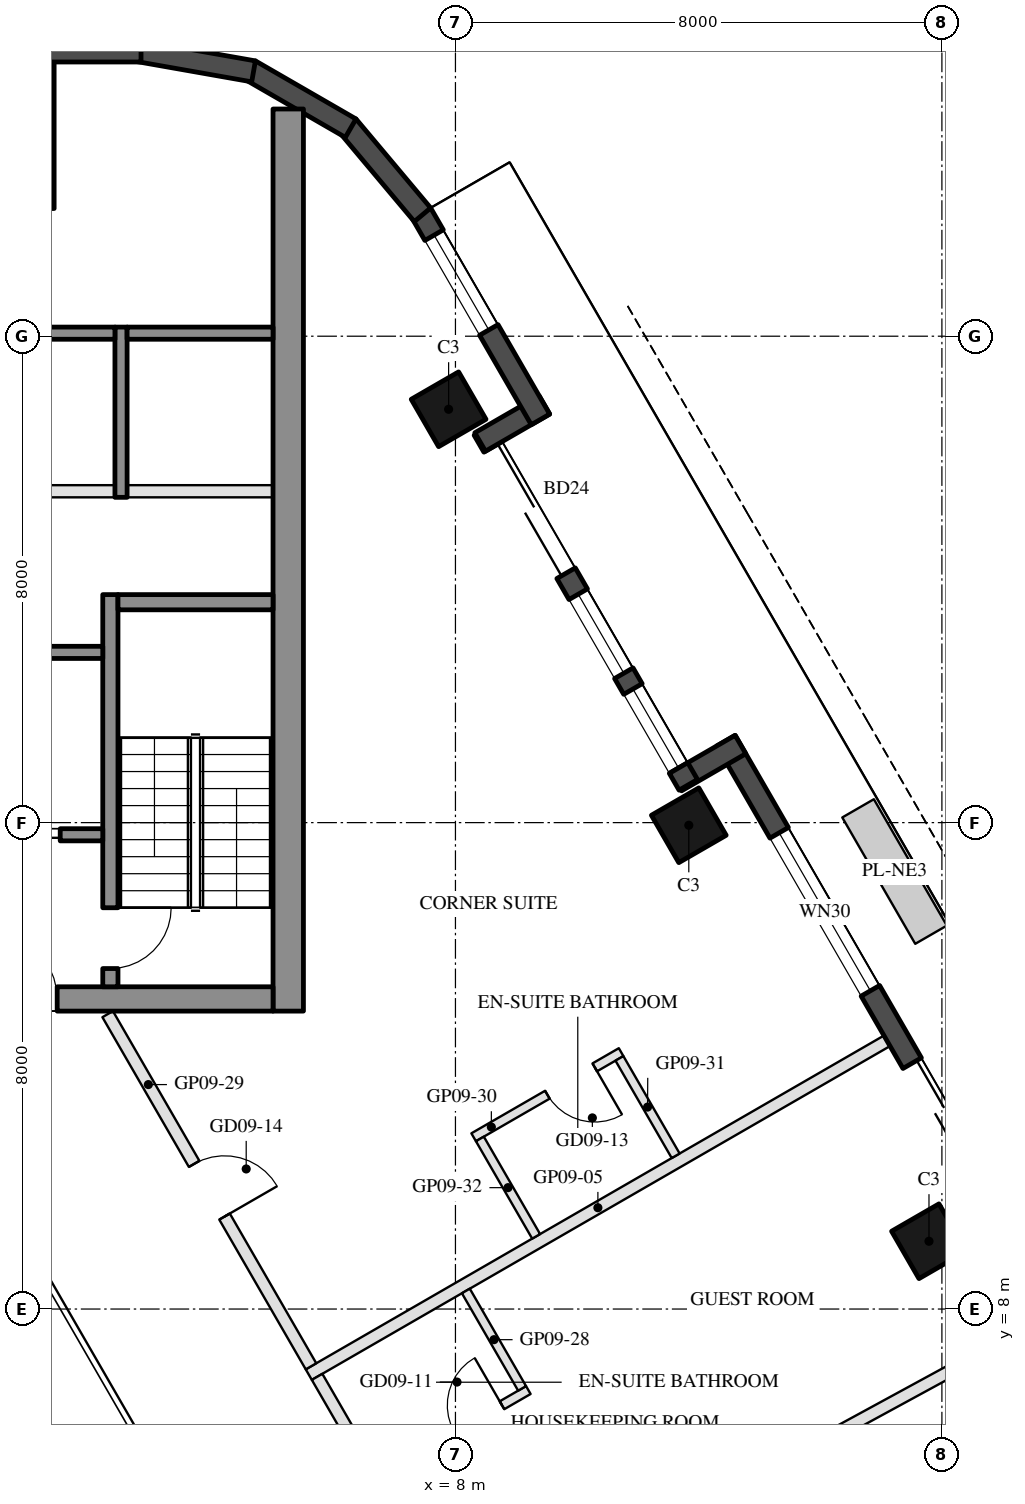
"""IFC4 building model, lengths in metres.
Left out: names, types, materials, properties, quantities, classifications, styles, units other than length and angle.
Written with IfcOpenShell. Run it as: python <this file> out.ifc"""

import sys

from ifc_helpers import new_model, si_unit, direction, frame, frame_2d, origin, origin_2d, place, context, subcontext, project, spatial, rectangle, hollow_rectangle, extrude, element, fill, save


model = new_model("IFC4")
c1 = context("Model", 3, precision=1e-05, world=origin(), true_north=direction((0.0, 1.0)))
c2 = subcontext(c1, "Body", "Model", "MODEL_VIEW")
j1 = project(units=[si_unit("LENGTHUNIT", "METRE"), si_unit("PLANEANGLEUNIT", "RADIAN")], contexts=[c1])
p1 = place(None, origin())
s1 = spatial("IfcSite", under=j1, at=p1, CompositionType="ELEMENT")
p2 = place(p1, origin())
s2 = spatial("IfcBuilding", under=s1, at=p2, CompositionType="ELEMENT")
p3 = place(p2, frame((0.0, 0.0, 109.4)))
s3 = spatial("IfcBuildingStorey", under=s2, at=p3, CompositionType="ELEMENT", Elevation=109.4)
for number, where, z_axis, x_axis in (
    (1, (15.788, 9.115, 0.0), (0.0, 0.0, 1.0), (-0.5, 0.866, 0.0)),
    (2, (11.838, 15.957, 0.0), (0.0, 0.0, 1.0), (-0.5, 0.866, 0.0)),
    (3, (7.888, 22.798, 0.0), (0.0, 0.0, 1.0), (-0.5, 0.866, 0.0)),
):
    element("IfcColumn", number, at=place(p3, frame(where, z_axis=z_axis, x_axis=x_axis)), inside=s3, PredefinedType="COLUMN", context=c2, shape_type="SweptSolid", body=[
        extrude(hollow_rectangle(XDim=0.9, YDim=0.9, WallThickness=0.04, at=origin_2d()), origin(), (0.0, 0.0, 1.0), 3.7),
    ])
p4 = place(p3, frame((0.0, 27.3, 0.0), z_axis=(0.0, 0.0, 1.0), x_axis=(1.0, 0.0, 0.0)))
e4 = element("IfcColumn", 4, at=p4, inside=s3, PredefinedType="COLUMN", context=c2, shape_type="SweptSolid", body=[
    extrude(hollow_rectangle(XDim=2.8, YDim=2.4, WallThickness=0.07, at=origin_2d()), origin(), (0.0, 0.0, 1.0), 3.7),
])
p5 = place(p3, frame((17.299, 8.948, 0.0), z_axis=(0.0, 0.0, 1.0), x_axis=(-0.500010041276, 0.866019606374, 0.0)))
e5 = element("IfcWall", 5, at=p5, inside=s3, PredefinedType="SOLIDWALL", context=c2, shape_type="SweptSolid", body=[
    extrude(rectangle(XDim=9.7, YDim=0.35, at=frame_2d((4.85, 0.0))), origin(), (0.0, 0.0, 1.0), 3.55),
])
p6 = place(p5, frame((1.775, 0.0, 0.0)))
e6 = element("IfcOpeningElement", 6, at=p6, cuts=e5, PredefinedType="OPENING", context=c2, shape_type="SweptSolid", body=[
    extrude(rectangle(XDim=1.8, YDim=2.4, at=frame_2d((0.9, 1.2))), frame((0.0, 0.185, 0.0), z_axis=(0.0, -1.0, 0.0), x_axis=(1.0, 0.0, 0.0)), (0.0, 0.0, 1.0), 0.37),
])
p7 = place(p5, frame((4.949, 0.0, 0.3)))
e7 = element("IfcOpeningElement", 7, at=p7, cuts=e5, PredefinedType="OPENING", context=c2, shape_type="SweptSolid", body=[
    extrude(rectangle(XDim=3.0, YDim=2.65, at=frame_2d((1.5, 1.325))), frame((0.0, 0.185, 0.0), z_axis=(0.0, -1.0, 0.0), x_axis=(1.0, 0.0, 0.0)), (0.0, 0.0, 1.0), 0.37),
])
p8 = place(p3, frame((12.688, 17.284, 0.0), z_axis=(0.0, 0.0, 1.0), x_axis=(-0.865955602162, -0.500120880472, 0.0)))
e8 = element("IfcWall", 8, at=p8, inside=s3, PredefinedType="SOLIDWALL", context=c2, shape_type="SweptSolid", body=[
    extrude(rectangle(XDim=1.22, YDim=0.35, at=frame_2d((0.61, 0.0))), origin(), (0.0, 0.0, 1.0), 3.55),
])
p9 = place(p3, frame((11.829, 16.621, 0.0), z_axis=(0.0, 0.0, 1.0), x_axis=(-0.500003597184, 0.866023326939, 0.0)))
e9 = element("IfcWall", 9, at=p9, inside=s3, PredefinedType="SOLIDWALL", context=c2, shape_type="SweptSolid", body=[
    extrude(rectangle(XDim=6.74, YDim=0.35, at=frame_2d((3.37, 0.0))), origin(), (0.0, 0.0, 1.0), 3.55),
])
p10 = place(p9, frame((4.02, 0.0, 0.0)))
e10 = element("IfcOpeningElement", 10, at=p10, cuts=e9, PredefinedType="OPENING", context=c2, shape_type="SweptSolid", body=[
    extrude(rectangle(XDim=2.4, YDim=2.4, at=frame_2d((1.2, 1.2))), frame((0.0, 0.185, 0.0), z_axis=(0.0, -1.0, 0.0), x_axis=(1.0, 0.0, 0.0)), (0.0, 0.0, 1.0), 0.37),
])
p11 = place(p9, frame((0.32, 0.0, 0.3)))
e11 = element("IfcOpeningElement", 11, at=p11, cuts=e9, PredefinedType="OPENING", context=c2, shape_type="SweptSolid", body=[
    extrude(rectangle(XDim=1.5, YDim=2.65, at=frame_2d((0.75, 1.325))), frame((0.0, 0.185, 0.0), z_axis=(0.0, -1.0, 0.0), x_axis=(1.0, 0.0, 0.0)), (0.0, 0.0, 1.0), 0.37),
])
p12 = place(p9, frame((2.12, 0.0, 0.3)))
e12 = element("IfcOpeningElement", 12, at=p12, cuts=e9, PredefinedType="OPENING", context=c2, shape_type="SweptSolid", body=[
    extrude(rectangle(XDim=1.5, YDim=2.65, at=frame_2d((0.75, 1.325))), frame((0.0, 0.185, 0.0), z_axis=(0.0, -1.0, 0.0), x_axis=(1.0, 0.0, 0.0)), (0.0, 0.0, 1.0), 0.37),
])
p13 = place(p3, frame((8.406, 22.26, 0.0), z_axis=(0.0, 0.0, 1.0), x_axis=(0.865955602162, 0.500120880472, 0.0)))
e13 = element("IfcWall", 13, at=p13, inside=s3, PredefinedType="SOLIDWALL", context=c2, shape_type="SweptSolid", body=[
    extrude(rectangle(XDim=1.22, YDim=0.35, at=frame_2d((0.61, 0.0))), origin(), (0.0, 0.0, 1.0), 3.55),
])
p14 = place(p3, frame((9.398, 22.631, 0.0), z_axis=(0.0, 0.0, 1.0), x_axis=(-0.499954521343, 0.866051659307, 0.0)))
e14 = element("IfcWall", 14, at=p14, inside=s3, PredefinedType="SOLIDWALL", context=c2, shape_type="SweptSolid", body=[
    extrude(rectangle(XDim=3.916, YDim=0.35, at=frame_2d((1.958, 0.0))), origin(), (0.0, 0.0, 1.0), 3.55),
])
p15 = place(p14, frame((1.7, 0.0, 0.3)))
e15 = element("IfcOpeningElement", 15, at=p15, cuts=e14, PredefinedType="OPENING", context=c2, shape_type="SweptSolid", body=[
    extrude(rectangle(XDim=1.8, YDim=2.65, at=frame_2d((0.9, 1.325))), frame((0.0, 0.185, 0.0), z_axis=(0.0, -1.0, 0.0), x_axis=(1.0, 0.0, 0.0)), (0.0, 0.0, 1.0), 0.37),
])
p16 = place(p3, frame((7.458, 25.998, 0.0), z_axis=(0.0, 0.0, 1.0), x_axis=(-0.642808304945, 0.766027077259, 0.0)))
e16 = element("IfcWall", 16, at=p16, inside=s3, PredefinedType="SOLIDWALL", context=c2, shape_type="SweptSolid", body=[
    extrude(rectangle(XDim=1.91, YDim=0.35, at=frame_2d((0.955, 0.0))), origin(), (0.0, 0.0, 1.0), 3.55),
])
for number, where, z_axis, x_axis in (
    (17, (6.277, 27.422, 0.0), (0.0, 0.0, 1.0), (-0.866, 0.5, 0.0)),
    (18, (4.68, 28.356, 0.0), (0.0, 0.0, 1.0), (-0.985, 0.174, 0.0)),
):
    element("IfcWall", number, at=place(p3, frame(where, z_axis=z_axis, x_axis=x_axis)), inside=s3, PredefinedType="SOLIDWALL", context=c2, shape_type="SweptSolid", body=[
        extrude(rectangle(XDim=1.91, YDim=0.35, at=frame_2d((0.955, 0.0))), origin(), (0.0, 0.0, 1.0), 3.55),
    ])
p17 = place(p3, frame((2.829, 28.685, 0.0), z_axis=(0.0, 0.0, 1.0), x_axis=(-1.0, 0.0, 0.0)))
e19 = element("IfcWall", 19, at=p17, inside=s3, PredefinedType="SOLIDWALL", context=c2, shape_type="SweptSolid", body=[
    extrude(rectangle(XDim=5.658, YDim=0.35, at=frame_2d((2.829, 0.0))), origin(), (0.0, 0.0, 1.0), 3.55),
])
p18 = place(p3, frame((5.25, 12.9, 0.0), z_axis=(0.0, 0.0, 1.0), x_axis=(0.0, 1.0, 0.0)))
e20 = element("IfcWall", 20, at=p18, inside=s3, PredefinedType="SHEAR", context=c2, shape_type="SweptSolid", body=[
    extrude(rectangle(XDim=14.837, YDim=0.5, at=frame_2d((7.418, 0.0))), origin(), (0.0, 0.0, 1.0), 3.5),
])
p19 = place(p3, frame((5.0, 13.1, 0.0), z_axis=(0.0, 0.0, 1.0), x_axis=(-1.0, 0.0, 0.0)))
e21 = element("IfcWall", 21, at=p19, inside=s3, PredefinedType="SHEAR", context=c2, shape_type="SweptSolid", body=[
    extrude(rectangle(XDim=10.0, YDim=0.4, at=frame_2d((5.0, 0.0))), origin(), (0.0, 0.0, 1.0), 3.5),
])
p20 = place(p19, frame((3.55, 0.0, 0.0)))
e22 = element("IfcOpeningElement", 22, at=p20, cuts=e21, PredefinedType="OPENING", context=c2, shape_type="SweptSolid", body=[
    extrude(rectangle(XDim=1.1, YDim=2.1, at=frame_2d((0.55, 1.05))), frame((0.0, 0.21, 0.0), z_axis=(0.0, -1.0, 0.0), x_axis=(1.0, 0.0, 0.0)), (0.0, 0.0, 1.0), 0.42),
])
p21 = place(p19, frame((5.85, 0.0, 0.0)))
e23 = element("IfcOpeningElement", 23, at=p21, cuts=e21, PredefinedType="OPENING", context=c2, shape_type="SweptSolid", body=[
    extrude(rectangle(XDim=1.4, YDim=2.1, at=frame_2d((0.7, 1.05))), frame((0.0, 0.21, 0.0), z_axis=(0.0, -1.0, 0.0), x_axis=(1.0, 0.0, 0.0)), (0.0, 0.0, 1.0), 0.42),
])
p22 = place(p3, frame((2.325, 13.3, 0.0), z_axis=(0.0, 0.0, 1.0), x_axis=(0.0, 1.0, 0.0)))
e24 = element("IfcWall", 24, at=p22, inside=s3, PredefinedType="SHEAR", context=c2, shape_type="SweptSolid", body=[
    extrude(rectangle(XDim=6.45, YDim=0.25, at=frame_2d((3.225, 0.0))), origin(), (0.0, 0.0, 1.0), 3.5),
])
p23 = place(p22, frame((0.3, 0.0, 0.0)))
e25 = element("IfcOpeningElement", 25, at=p23, cuts=e24, PredefinedType="OPENING", context=c2, shape_type="SweptSolid", body=[
    extrude(rectangle(XDim=1.0, YDim=2.1, at=frame_2d((0.5, 1.05))), frame((0.0, 0.135, 0.0), z_axis=(0.0, -1.0, 0.0), x_axis=(1.0, 0.0, 0.0)), (0.0, 0.0, 1.0), 0.27),
])
p24 = place(p3, frame((5.0, 19.625, 0.0), z_axis=(0.0, 0.0, 1.0), x_axis=(-1.0, 0.0, 0.0)))
e26 = element("IfcWall", 26, at=p24, inside=s3, PredefinedType="SHEAR", context=c2, shape_type="SweptSolid", body=[
    extrude(rectangle(XDim=2.55, YDim=0.25, at=frame_2d((1.275, 0.0))), origin(), (0.0, 0.0, 1.0), 3.5),
])
p25 = place(p3, frame((2.2, 18.8, 0.0), z_axis=(0.0, 0.0, 1.0), x_axis=(-1.0, 0.0, 0.0)))
e27 = element("IfcWall", 27, at=p25, inside=s3, PredefinedType="SHEAR", context=c2, shape_type="SweptSolid", body=[
    extrude(rectangle(XDim=2.8, YDim=0.2, at=frame_2d((1.4, 0.0))), origin(), (0.0, 0.0, 1.0), 3.5),
])
p26 = place(p3, frame((2.2, 15.8, 0.0), z_axis=(0.0, 0.0, 1.0), x_axis=(-1.0, 0.0, 0.0)))
e28 = element("IfcWall", 28, at=p26, inside=s3, PredefinedType="SHEAR", context=c2, shape_type="SweptSolid", body=[
    extrude(rectangle(XDim=2.8, YDim=0.2, at=frame_2d((1.4, 0.0))), origin(), (0.0, 0.0, 1.0), 3.5),
])
p27 = place(p26, frame((0.7, 0.0, 0.0)))
e29 = element("IfcOpeningElement", 29, at=p27, cuts=e28, PredefinedType="OPENING", context=c2, shape_type="SweptSolid", body=[
    extrude(rectangle(XDim=1.2, YDim=2.1, at=frame_2d((0.6, 1.05))), frame((0.0, 0.11, 0.0), z_axis=(0.0, -1.0, 0.0), x_axis=(1.0, 0.0, 0.0)), (0.0, 0.0, 1.0), 0.22),
])
p28 = place(p3, frame((2.5, 21.35, 0.0), z_axis=(0.0, 0.0, 1.0), x_axis=(0.0, 1.0, 0.0)))
e30 = element("IfcWall", 30, at=p28, inside=s3, PredefinedType="SHEAR", context=c2, shape_type="SweptSolid", body=[
    extrude(rectangle(XDim=2.8, YDim=0.2, at=frame_2d((1.4, 0.0))), origin(), (0.0, 0.0, 1.0), 3.5),
])
p29 = place(p3, frame((5.0, 24.05, 0.0), z_axis=(0.0, 0.0, 1.0), x_axis=(-1.0, 0.0, 0.0)))
e31 = element("IfcWall", 31, at=p29, inside=s3, PredefinedType="SHEAR", context=c2, shape_type="SweptSolid", body=[
    extrude(rectangle(XDim=2.4, YDim=0.2, at=frame_2d((1.2, 0.0))), origin(), (0.0, 0.0, 1.0), 3.5),
])
p30 = place(p3, frame((2.4, 24.05, 0.0), z_axis=(0.0, 0.0, 1.0), x_axis=(-1.0, 0.0, 0.0)))
e32 = element("IfcWall", 32, at=p30, inside=s3, PredefinedType="SHEAR", context=c2, shape_type="SweptSolid", body=[
    extrude(rectangle(XDim=2.8, YDim=0.2, at=frame_2d((1.4, 0.0))), origin(), (0.0, 0.0, 1.0), 3.5),
])
p31 = place(p3, frame((5.0, 21.45, 0.0), z_axis=(0.0, 0.0, 1.0), x_axis=(-1.0, 0.0, 0.0)))
e33 = element("IfcWall", 33, at=p31, inside=s3, PredefinedType="PARTITIONING", context=c2, shape_type="SweptSolid", body=[
    extrude(rectangle(XDim=2.4, YDim=0.2, at=frame_2d((1.2, 0.0))), origin(), (0.0, 0.0, 1.0), 3.5),
])
p32 = place(p3, frame((2.4, 21.45, 0.0), z_axis=(0.0, 0.0, 1.0), x_axis=(-1.0, 0.0, 0.0)))
e34 = element("IfcWall", 34, at=p32, inside=s3, PredefinedType="PARTITIONING", context=c2, shape_type="SweptSolid", body=[
    extrude(rectangle(XDim=2.8, YDim=0.2, at=frame_2d((1.4, 0.0))), origin(), (0.0, 0.0, 1.0), 3.5),
])
p33 = place(p3, frame((16.941, 7.417, 0.0), z_axis=(0.0, 0.0, 1.0), x_axis=(-0.878270052011, -0.478164946164, 0.0)))
e35 = element("IfcWall", 35, at=p33, inside=s3, PredefinedType="PARTITIONING", context=c2, shape_type="SweptSolid", body=[
    extrude(rectangle(XDim=10.083, YDim=0.2, at=frame_2d((5.042, 0.0))), origin(), (0.0, 0.0, 1.0), 2.96),
])
p34 = place(p3, frame((15.097, 12.411, 0.0), z_axis=(0.0, 0.0, 1.0), x_axis=(-0.866027479907, -0.499996404033, 0.0)))
e36 = element("IfcWall", 36, at=p34, inside=s3, PredefinedType="PARTITIONING", context=c2, shape_type="SweptSolid", body=[
    extrude(rectangle(XDim=10.98, YDim=0.2, at=frame_2d((5.49, 0.0))), origin(), (0.0, 0.0, 1.0), 2.96),
])
p35 = place(p3, frame((17.634, 6.217, 0.0), z_axis=(0.0, 0.0, 1.0), x_axis=(-0.844171272136, -0.536073561463, 0.0)))
e37 = element("IfcWall", 37, at=p35, inside=s3, PredefinedType="PARTITIONING", context=c2, shape_type="SweptSolid", body=[
    extrude(rectangle(XDim=10.089, YDim=0.15, at=frame_2d((5.044, 0.0))), origin(), (0.0, 0.0, 1.0), 2.95),
])
p36 = place(p3, frame((5.725, 6.885, 0.0), z_axis=(0.0, 0.0, 1.0), x_axis=(0.499986760557, -0.866033047446, 0.0)))
e38 = element("IfcWall", 38, at=p36, inside=s3, PredefinedType="PARTITIONING", context=c2, shape_type="SweptSolid", body=[
    extrude(rectangle(XDim=4.798, YDim=0.2, at=frame_2d((2.399, 0.0))), origin(), (0.0, 0.0, 1.0), 2.95),
])
p37 = place(p36, frame((2.45, 0.0, 0.0)))
e39 = element("IfcOpeningElement", 39, at=p37, cuts=e38, PredefinedType="OPENING", context=c2, shape_type="SweptSolid", body=[
    extrude(rectangle(XDim=1.0, YDim=2.1, at=frame_2d((0.5, 1.05))), frame((0.0, 0.11, 0.0), z_axis=(0.0, -1.0, 0.0), x_axis=(1.0, 0.0, 0.0)), (0.0, 0.0, 1.0), 0.22),
])
p38 = place(p3, frame((6.774, 5.268, 0.0), z_axis=(0.0, 0.0, 1.0), x_axis=(0.866034573852, 0.49998411664, 0.0)))
e40 = element("IfcWall", 40, at=p38, inside=s3, PredefinedType="PARTITIONING", context=c2, shape_type="SweptSolid", body=[
    extrude(rectangle(XDim=2.8, YDim=0.15, at=frame_2d((1.4, 0.0))), origin(), (0.0, 0.0, 1.0), 3.55),
])
p39 = place(p38, frame((1.4, 0.0, 0.0)))
e41 = element("IfcOpeningElement", 41, at=p39, cuts=e40, PredefinedType="OPENING", context=c2, shape_type="SweptSolid", body=[
    extrude(rectangle(XDim=0.9, YDim=2.1, at=frame_2d((0.45, 1.05))), frame((0.0, 0.085, 0.0), z_axis=(0.0, -1.0, 0.0), x_axis=(1.0, 0.0, 0.0)), (0.0, 0.0, 1.0), 0.17),
])
p40 = place(p3, frame((9.096, 6.695, 0.0), z_axis=(0.0, 0.0, 1.0), x_axis=(-0.500042316284, 0.866000971088, 0.0)))
e42 = element("IfcWall", 42, at=p40, inside=s3, PredefinedType="PARTITIONING", context=c2, shape_type="SweptSolid", body=[
    extrude(rectangle(XDim=1.85, YDim=0.15, at=frame_2d((0.925, 0.0))), origin(), (0.0, 0.0, 1.0), 3.55),
])
p41 = place(p3, frame((2.281, 12.85, 0.0), z_axis=(0.0, 0.0, 1.0), x_axis=(0.499982611572, -0.866035442765, 0.0)))
e43 = element("IfcWall", 43, at=p41, inside=s3, PredefinedType="PARTITIONING", context=c2, shape_type="SweptSolid", body=[
    extrude(rectangle(XDim=6.688, YDim=0.2, at=frame_2d((3.344, 0.0))), origin(), (0.0, 0.0, 1.0), 2.95),
])
p42 = place(p41, frame((2.844, 0.0, 0.0)))
e44 = element("IfcOpeningElement", 44, at=p42, cuts=e43, PredefinedType="OPENING", context=c2, shape_type="SweptSolid", body=[
    extrude(rectangle(XDim=1.0, YDim=2.1, at=frame_2d((0.5, 1.05))), frame((0.0, 0.11, 0.0), z_axis=(0.0, -1.0, 0.0), x_axis=(1.0, 0.0, 0.0)), (0.0, 0.0, 1.0), 0.22),
])
p43 = place(p3, frame((10.724, 12.225, 0.0), z_axis=(0.0, 0.0, 1.0), x_axis=(-0.866018616679, -0.500011755427, 0.0)))
e45 = element("IfcWall", 45, at=p43, inside=s3, PredefinedType="PARTITIONING", context=c2, shape_type="SweptSolid", body=[
    extrude(rectangle(XDim=2.8, YDim=0.15, at=frame_2d((1.4, 0.0))), origin(), (0.0, 0.0, 1.0), 3.55),
])
p44 = place(p43, frame((0.5, 0.0, 0.0)))
e46 = element("IfcOpeningElement", 46, at=p44, cuts=e45, PredefinedType="OPENING", context=c2, shape_type="SweptSolid", body=[
    extrude(rectangle(XDim=0.9, YDim=2.1, at=frame_2d((0.45, 1.05))), frame((0.0, 0.085, 0.0), z_axis=(0.0, -1.0, 0.0), x_axis=(1.0, 0.0, 0.0)), (0.0, 0.0, 1.0), 0.17),
])
p45 = place(p3, frame((11.622, 10.521, 0.0), z_axis=(0.0, 0.0, 1.0), x_axis=(-0.500042316284, 0.866000971088, 0.0)))
e47 = element("IfcWall", 47, at=p45, inside=s3, PredefinedType="PARTITIONING", context=c2, shape_type="SweptSolid", body=[
    extrude(rectangle(XDim=1.85, YDim=0.15, at=frame_2d((0.925, 0.0))), origin(), (0.0, 0.0, 1.0), 2.95),
])
p46 = place(p3, frame((9.327, 9.195, 0.0), z_axis=(0.0, 0.0, 1.0), x_axis=(-0.499985172903, 0.866033964044, 0.0)))
e48 = element("IfcWall", 48, at=p46, inside=s3, PredefinedType="PARTITIONING", context=c2, shape_type="SweptSolid", body=[
    extrude(rectangle(XDim=1.85, YDim=0.15, at=frame_2d((0.925, 0.0))), origin(), (0.0, 0.0, 1.0), 2.95),
])
p47 = place(p6, frame((1.8, 0.0, 0.0), z_axis=(0.0, 0.0, 1.0), x_axis=(-1.0, 0.0, 0.0)))
e49 = element("IfcDoor", 49, at=p47, inside=s3, OperationType="SLIDING_TO_LEFT", PredefinedType="DOOR", context=c2, shape_type="SweptSolid", body=[
    extrude(rectangle(XDim=1.8, YDim=2.4, at=frame_2d((0.9, 1.2))), frame((0.0, 0.025, 0.0), z_axis=(0.0, -1.0, 0.0), x_axis=(1.0, 0.0, 0.0)), (0.0, 0.0, 1.0), 0.05),
])
fill(e6, e49)
p48 = place(p7, origin())
e50 = element("IfcWindow", 50, at=p48, inside=s3, PartitioningType="SINGLE_PANEL", PredefinedType="WINDOW", context=c2, shape_type="SweptSolid", body=[
    extrude(rectangle(XDim=3.0, YDim=2.65, at=frame_2d((1.5, 1.325))), frame((0.0, 0.03, 0.0), z_axis=(0.0, -1.0, 0.0), x_axis=(1.0, 0.0, 0.0)), (0.0, 0.0, 1.0), 0.06),
])
fill(e7, e50)
p49 = place(p10, frame((2.4, 0.0, 0.0), z_axis=(0.0, 0.0, 1.0), x_axis=(-1.0, 0.0, 0.0)))
e51 = element("IfcDoor", 51, at=p49, inside=s3, OperationType="SLIDING_TO_LEFT", PredefinedType="DOOR", context=c2, shape_type="SweptSolid", body=[
    extrude(rectangle(XDim=2.4, YDim=2.4, at=frame_2d((1.2, 1.2))), frame((0.0, 0.025, 0.0), z_axis=(0.0, -1.0, 0.0), x_axis=(1.0, 0.0, 0.0)), (0.0, 0.0, 1.0), 0.05),
])
fill(e10, e51)
p50 = place(p11, origin())
e52 = element("IfcWindow", 52, at=p50, inside=s3, PartitioningType="SINGLE_PANEL", PredefinedType="WINDOW", context=c2, shape_type="SweptSolid", body=[
    extrude(rectangle(XDim=1.5, YDim=2.65, at=frame_2d((0.75, 1.325))), frame((0.0, 0.03, 0.0), z_axis=(0.0, -1.0, 0.0), x_axis=(1.0, 0.0, 0.0)), (0.0, 0.0, 1.0), 0.06),
])
fill(e11, e52)
p51 = place(p12, origin())
e53 = element("IfcWindow", 53, at=p51, inside=s3, PartitioningType="SINGLE_PANEL", PredefinedType="WINDOW", context=c2, shape_type="SweptSolid", body=[
    extrude(rectangle(XDim=1.5, YDim=2.65, at=frame_2d((0.75, 1.325))), frame((0.0, 0.03, 0.0), z_axis=(0.0, -1.0, 0.0), x_axis=(1.0, 0.0, 0.0)), (0.0, 0.0, 1.0), 0.06),
])
fill(e12, e53)
p52 = place(p15, origin())
e54 = element("IfcWindow", 54, at=p52, inside=s3, PartitioningType="SINGLE_PANEL", PredefinedType="WINDOW", context=c2, shape_type="SweptSolid", body=[
    extrude(rectangle(XDim=1.8, YDim=2.65, at=frame_2d((0.9, 1.325))), frame((0.0, 0.03, 0.0), z_axis=(0.0, -1.0, 0.0), x_axis=(1.0, 0.0, 0.0)), (0.0, 0.0, 1.0), 0.06),
])
fill(e15, e54)
p53 = place(p27, origin())
e55 = element("IfcDoor", 55, at=p53, inside=s3, OperationType="DOUBLE_DOOR_SLIDING", PredefinedType="DOOR", context=c2, shape_type="SweptSolid", body=[
    extrude(rectangle(XDim=1.2, YDim=2.1, at=frame_2d((0.6, 1.05))), frame((0.0, 0.025, 0.0), z_axis=(0.0, -1.0, 0.0), x_axis=(1.0, 0.0, 0.0)), (0.0, 0.0, 1.0), 0.05),
])
fill(e29, e55)
p54 = place(p20, frame((1.1, 0.0, 0.0), z_axis=(0.0, 0.0, 1.0), x_axis=(-1.0, 0.0, 0.0)))
e56 = element("IfcDoor", 56, at=p54, inside=s3, OperationType="SINGLE_SWING_LEFT", PredefinedType="DOOR", context=c2, shape_type="SweptSolid", body=[
    extrude(rectangle(XDim=1.1, YDim=2.1, at=frame_2d((0.55, 1.05))), frame((0.0, 0.025, 0.0), z_axis=(0.0, -1.0, 0.0), x_axis=(1.0, 0.0, 0.0)), (0.0, 0.0, 1.0), 0.05),
])
fill(e22, e56)
p55 = place(p23, frame((1.0, 0.0, 0.0), z_axis=(0.0, 0.0, 1.0), x_axis=(-1.0, 0.0, 0.0)))
e57 = element("IfcDoor", 57, at=p55, inside=s3, OperationType="SINGLE_SWING_LEFT", PredefinedType="DOOR", context=c2, shape_type="SweptSolid", body=[
    extrude(rectangle(XDim=1.0, YDim=2.1, at=frame_2d((0.5, 1.05))), frame((0.0, 0.025, 0.0), z_axis=(0.0, -1.0, 0.0), x_axis=(1.0, 0.0, 0.0)), (0.0, 0.0, 1.0), 0.05),
])
fill(e25, e57)
p56 = place(p39, origin())
e58 = element("IfcDoor", 58, at=p56, inside=s3, OperationType="SINGLE_SWING_RIGHT", PredefinedType="DOOR", context=c2, shape_type="SweptSolid", body=[
    extrude(rectangle(XDim=0.9, YDim=2.1, at=frame_2d((0.45, 1.05))), frame((0.0, 0.025, 0.0), z_axis=(0.0, -1.0, 0.0), x_axis=(1.0, 0.0, 0.0)), (0.0, 0.0, 1.0), 0.05),
])
fill(e41, e58)
p57 = place(p44, origin())
e59 = element("IfcDoor", 59, at=p57, inside=s3, OperationType="SINGLE_SWING_LEFT", PredefinedType="DOOR", context=c2, shape_type="SweptSolid", body=[
    extrude(rectangle(XDim=0.9, YDim=2.1, at=frame_2d((0.45, 1.05))), frame((0.0, 0.025, 0.0), z_axis=(0.0, -1.0, 0.0), x_axis=(1.0, 0.0, 0.0)), (0.0, 0.0, 1.0), 0.05),
])
fill(e46, e59)
p58 = place(p42, origin())
e60 = element("IfcDoor", 60, at=p58, inside=s3, OperationType="SINGLE_SWING_RIGHT", PredefinedType="DOOR", context=c2, shape_type="SweptSolid", body=[
    extrude(rectangle(XDim=1.0, YDim=2.1, at=frame_2d((0.5, 1.05))), frame((0.0, 0.025, 0.0), z_axis=(0.0, -1.0, 0.0), x_axis=(1.0, 0.0, 0.0)), (0.0, 0.0, 1.0), 0.05),
])
fill(e44, e60)
save(model, sys.argv[1])
